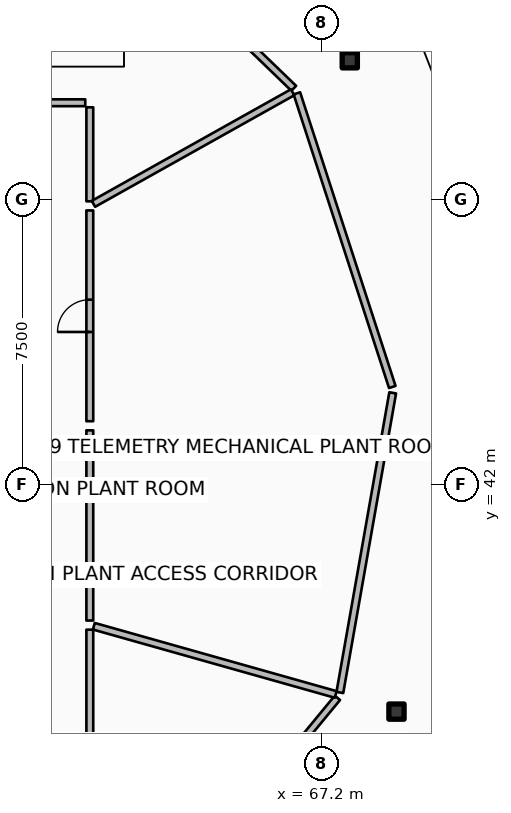
"""IFC4 building model, lengths in metres.
Left out: names, types, materials, properties, quantities, classifications, styles, units other than length and angle.
Written with IfcOpenShell. Run it as: python <this file> out.ifc"""

import sys

from ifc_helpers import new_model, si_unit, direction, frame, frame_2d, origin, origin_2d, place, context, subcontext, project, spatial, rectangle, hollow_rectangle, extrude, element, fill, save


model = new_model("IFC4")
c1 = context("Model", 3, precision=1e-05, world=origin(), true_north=direction((0.0, 1.0)))
c2 = subcontext(c1, "Body", "Model", "MODEL_VIEW")
j1 = project(units=[si_unit("LENGTHUNIT", "METRE"), si_unit("PLANEANGLEUNIT", "RADIAN")], contexts=[c1])
p1 = place(None, origin())
s1 = spatial("IfcSite", under=j1, at=p1, CompositionType="ELEMENT")
p2 = place(p1, origin())
s2 = spatial("IfcBuilding", under=s1, at=p2, CompositionType="ELEMENT")
p3 = place(p2, frame((0.0, 0.0, 356.0)))
s3 = spatial("IfcBuildingStorey", under=s2, at=p3, CompositionType="ELEMENT", Elevation=356.0)
for number, where, z_axis, x_axis in (
    (1, (67.941, 53.167, 0.0), (0.0, 0.0, 1.0), (1.0, 0.0, 0.0)),
    (2, (69.17, 36.03, 0.0), (0.0, 0.0, 1.0), (1.0, 0.0, 0.0)),
):
    element("IfcColumn", number, at=place(p3, frame(where, z_axis=z_axis, x_axis=x_axis)), inside=s3, PredefinedType="COLUMN", context=c2, shape_type="SweptSolid", body=[
        extrude(hollow_rectangle(XDim=0.4, YDim=0.4, WallThickness=0.02, InnerFilletRadius=0.02, OuterFilletRadius=0.04, at=origin_2d()), origin(), (0.0, 0.0, 1.0), 3.32),
    ])
p4 = place(p3, frame((66.467, 52.43, 0.0), z_axis=(0.0, 0.0, 1.0), x_axis=(-0.719364153135, 0.694633151516, 0.0)))
e3 = element("IfcWall", 3, at=p4, inside=s3, PredefinedType="PARTITIONING", context=c2, shape_type="SweptSolid", body=[
    extrude(rectangle(XDim=8.006, YDim=0.18, at=frame_2d((4.003, 0.0))), origin(), (0.0, 0.0, 1.0), 2.76),
])
p5 = place(p3, frame((62.742, 30.48, 0.0), z_axis=(0.0, 0.0, 1.0), x_axis=(0.636018833443, 0.771673534278, 0.0)))
e4 = element("IfcWall", 4, at=p5, inside=s3, PredefinedType="PARTITIONING", context=c2, shape_type="SweptSolid", body=[
    extrude(rectangle(XDim=7.661, YDim=0.18, at=frame_2d((3.831, 0.0))), origin(), (0.0, 0.0, 1.0), 2.76),
])
p6 = place(p3, frame((67.68, 36.532, 0.0), z_axis=(0.0, 0.0, 1.0), x_axis=(0.173668776466, 0.984804120666, 0.0)))
e5 = element("IfcWall", 5, at=p6, inside=s3, PredefinedType="PARTITIONING", context=c2, shape_type="SweptSolid", body=[
    extrude(rectangle(XDim=8.006, YDim=0.18, at=frame_2d((4.003, 0.0))), origin(), (0.0, 0.0, 1.0), 2.76),
])
p7 = place(p3, frame((69.059, 44.572, 0.0), z_axis=(0.0, 0.0, 1.0), x_axis=(-0.309024234991, 0.951054163646, 0.0)))
e6 = element("IfcWall", 6, at=p7, inside=s3, PredefinedType="PARTITIONING", context=c2, shape_type="SweptSolid", body=[
    extrude(rectangle(XDim=8.124, YDim=0.18, at=frame_2d((4.062, 0.0))), origin(), (0.0, 0.0, 1.0), 2.76),
])
p8 = place(p3, frame((61.1, 49.456, 0.0), z_axis=(0.0, 0.0, 1.0), x_axis=(0.0, 1.0, 0.0)))
e7 = element("IfcWall", 7, at=p8, inside=s3, PredefinedType="PARTITIONING", context=c2, shape_type="SweptSolid", body=[
    extrude(rectangle(XDim=2.474, YDim=0.18, at=frame_2d((1.237, 0.0))), origin(), (0.0, 0.0, 1.0), 2.76),
])
p9 = place(p3, frame((60.98, 52.05, 0.0), z_axis=(0.0, 0.0, 1.0), x_axis=(-1.0, 0.0, 0.0)))
e8 = element("IfcWall", 8, at=p9, inside=s3, PredefinedType="PARTITIONING", context=c2, shape_type="SweptSolid", body=[
    extrude(rectangle(XDim=4.937, YDim=0.18, at=frame_2d((2.469, 0.0))), origin(), (0.0, 0.0, 1.0), 2.76),
])
p10 = place(p9, frame((1.944, 0.0, 0.0)))
e9 = element("IfcOpeningElement", 9, at=p10, cuts=e8, PredefinedType="OPENING", context=c2, shape_type="SweptSolid", body=[
    extrude(rectangle(XDim=1.05, YDim=2.1, at=frame_2d((0.525, 1.05))), frame((0.0, 0.1, 0.0), z_axis=(0.0, -1.0, 0.0), x_axis=(1.0, 0.0, 0.0)), (0.0, 0.0, 1.0), 0.2),
])
p11 = place(p3, frame((61.196, 49.39, 0.0), z_axis=(0.0, 0.0, 1.0), x_axis=(0.87249769897, 0.488618220385, 0.0)))
e10 = element("IfcWall", 10, at=p11, inside=s3, PredefinedType="PARTITIONING", context=c2, shape_type="SweptSolid", body=[
    extrude(rectangle(XDim=6.007, YDim=0.18, at=frame_2d((3.003, 0.0))), origin(), (0.0, 0.0, 1.0), 2.76),
])
p12 = place(p3, frame((61.1, 32.07, 0.0), z_axis=(0.0, 0.0, 1.0), x_axis=(0.0, 1.0, 0.0)))
e11 = element("IfcWall", 11, at=p12, inside=s3, PredefinedType="PARTITIONING", context=c2, shape_type="SweptSolid", body=[
    extrude(rectangle(XDim=6.115, YDim=0.18, at=frame_2d((3.058, 0.0))), origin(), (0.0, 0.0, 1.0), 2.76),
])
p13 = place(p3, frame((61.206, 38.275, 0.0), z_axis=(0.0, 0.0, 1.0), x_axis=(0.962461547865, -0.271418070294, 0.0)))
e12 = element("IfcWall", 12, at=p13, inside=s3, PredefinedType="PARTITIONING", context=c2, shape_type="SweptSolid", body=[
    extrude(rectangle(XDim=6.612, YDim=0.18, at=frame_2d((3.306, 0.0))), origin(), (0.0, 0.0, 1.0), 2.76),
])
p14 = place(p3, frame((61.1, 38.425, 0.0), z_axis=(0.0, 0.0, 1.0), x_axis=(0.0, 1.0, 0.0)))
e13 = element("IfcWall", 13, at=p14, inside=s3, PredefinedType="PARTITIONING", context=c2, shape_type="SweptSolid", body=[
    extrude(rectangle(XDim=5.005, YDim=0.18, at=frame_2d((2.502, 0.0))), origin(), (0.0, 0.0, 1.0), 2.76),
])
p15 = place(p3, frame((61.1, 43.67, 0.0), z_axis=(0.0, 0.0, 1.0), x_axis=(0.0, 1.0, 0.0)))
e14 = element("IfcWall", 14, at=p15, inside=s3, PredefinedType="PARTITIONING", context=c2, shape_type="SweptSolid", body=[
    extrude(rectangle(XDim=5.546, YDim=0.18, at=frame_2d((2.773, 0.0))), origin(), (0.0, 0.0, 1.0), 2.76),
])
p16 = place(p15, frame((2.348, 0.0, 0.0)))
e15 = element("IfcOpeningElement", 15, at=p16, cuts=e14, PredefinedType="OPENING", context=c2, shape_type="SweptSolid", body=[
    extrude(rectangle(XDim=0.85, YDim=2.06, at=frame_2d((0.425, 1.03))), frame((0.0, 0.1, 0.0), z_axis=(0.0, -1.0, 0.0), x_axis=(1.0, 0.0, 0.0)), (0.0, 0.0, 1.0), 0.2),
])
p17 = place(p16, origin())
e16 = element("IfcDoor", 16, at=p17, inside=s3, OperationType="SINGLE_SWING_LEFT", PredefinedType="DOOR", context=c2, shape_type="SweptSolid", body=[
    extrude(rectangle(XDim=0.85, YDim=2.06, at=frame_2d((0.425, 1.03))), frame((0.0, 0.025, 0.0), z_axis=(0.0, -1.0, 0.0), x_axis=(1.0, 0.0, 0.0)), (0.0, 0.0, 1.0), 0.05),
])
fill(e15, e16)
save(model, sys.argv[1])
